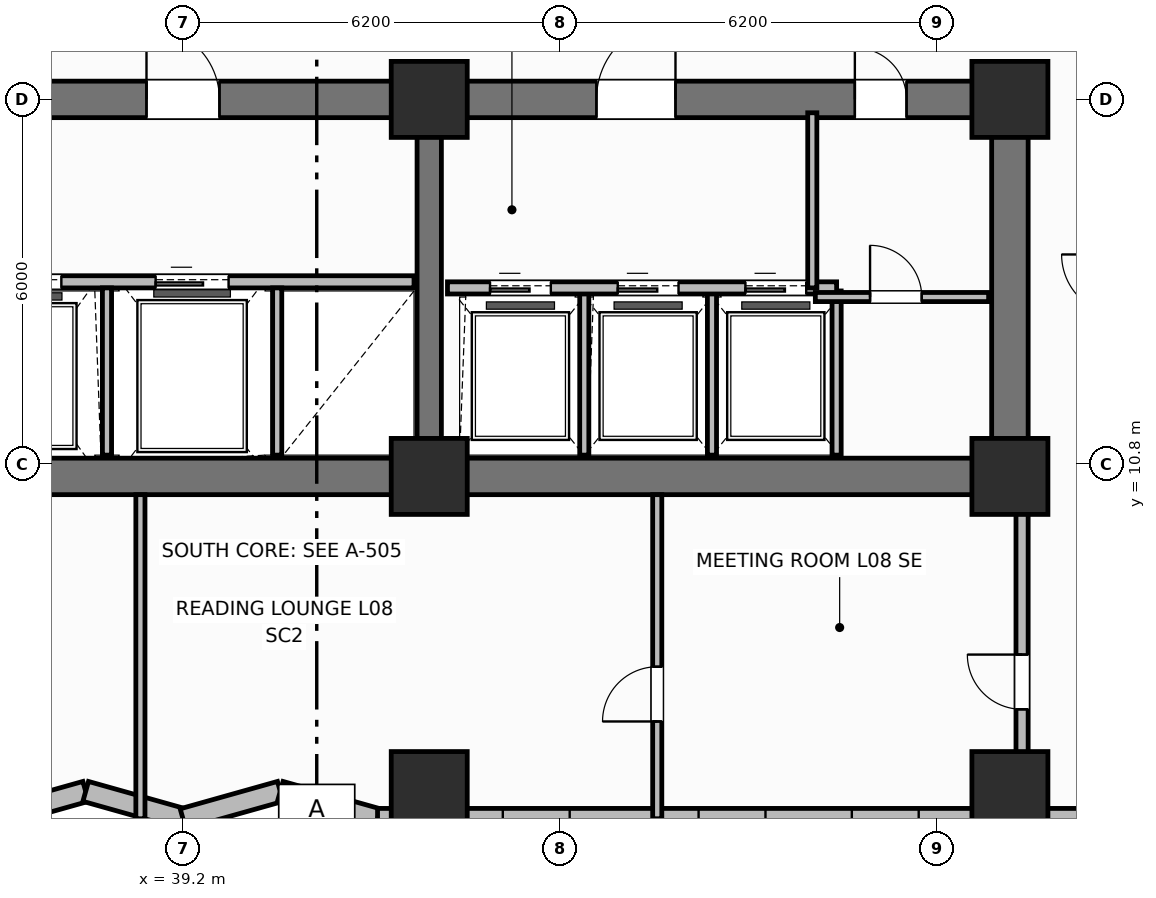
"""IFC4 building model, lengths in metres.
Left out: names, types, materials, properties, quantities, classifications, styles, units other than length and angle.
Written with IfcOpenShell. Run it as: python <this file> out.ifc"""

import sys

from ifc_helpers import new_model, si_unit, direction, frame, frame_2d, origin, origin_2d, place, context, subcontext, project, spatial, rectangle, extrude, element, fill, save


model = new_model("IFC4")
c1 = context("Model", 3, precision=1e-05, world=origin(), true_north=direction((0.0, 1.0)))
c2 = subcontext(c1, "Body", "Model", "MODEL_VIEW")
j1 = project(units=[si_unit("LENGTHUNIT", "METRE"), si_unit("PLANEANGLEUNIT", "RADIAN")], contexts=[c1])
p1 = place(None, origin())
s1 = spatial("IfcSite", under=j1, at=p1, CompositionType="ELEMENT")
p2 = place(p1, origin())
s2 = spatial("IfcBuilding", under=s1, at=p2, CompositionType="ELEMENT")
p3 = place(p2, frame((0.0, 0.0, 36.2)))
s3 = spatial("IfcBuildingStorey", under=s2, at=p3, CompositionType="ELEMENT", Elevation=36.2)
p4 = place(p3, frame((52.8, 10.6, 0.0), z_axis=(0.0, 0.0, 1.0), x_axis=(-1.0, 0.0, 0.0)))
e1 = element("IfcWall", 1, at=p4, inside=s3, PredefinedType="SHEAR", context=c2, shape_type="SweptSolid", body=[
    extrude(rectangle(XDim=27.2, YDim=0.6, at=frame_2d((13.6, 0.0))), origin(), (0.0, 0.0, 1.0), 3.7),
])
p5 = place(p3, frame((52.8, 10.9, 0.0), z_axis=(0.0, 0.0, 1.0), x_axis=(0.0, 1.0, 0.0)))
e2 = element("IfcWall", 2, at=p5, inside=s3, PredefinedType="SHEAR", context=c2, shape_type="SweptSolid", body=[
    extrude(rectangle(XDim=5.6, YDim=0.6, at=frame_2d((2.8, 0.0))), origin(), (0.0, 0.0, 1.0), 3.7),
])
p6 = place(p3, frame((25.6, 16.8, 0.0), z_axis=(0.0, 0.0, 1.0), x_axis=(1.0, 0.0, 0.0)))
e3 = element("IfcWall", 3, at=p6, inside=s3, PredefinedType="SHEAR", context=c2, shape_type="SweptSolid", body=[
    extrude(rectangle(XDim=27.2, YDim=0.6, at=frame_2d((13.6, 0.0))), origin(), (0.0, 0.0, 1.0), 3.7),
])
p7 = place(p6, frame((1.7, 0.0, 0.0)))
e4 = element("IfcOpeningElement", 4, at=p7, cuts=e3, PredefinedType="OPENING", context=c2, shape_type="SweptSolid", body=[
    extrude(rectangle(XDim=1.1, YDim=2.15, at=frame_2d((0.55, 1.075))), frame((0.0, 0.31, 0.0), z_axis=(0.0, -1.0, 0.0), x_axis=(1.0, 0.0, 0.0)), (0.0, 0.0, 1.0), 0.62),
])
p8 = place(p6, frame((4.45, 0.0, 0.0)))
e5 = element("IfcOpeningElement", 5, at=p8, cuts=e3, PredefinedType="OPENING", context=c2, shape_type="SweptSolid", body=[
    extrude(rectangle(XDim=0.85, YDim=2.1, at=frame_2d((0.425, 1.05))), frame((0.0, 0.31, 0.0), z_axis=(0.0, -1.0, 0.0), x_axis=(1.0, 0.0, 0.0)), (0.0, 0.0, 1.0), 0.62),
])
p9 = place(p6, frame((6.5, 0.0, 0.0)))
e6 = element("IfcOpeningElement", 6, at=p9, cuts=e3, PredefinedType="OPENING", context=c2, shape_type="SweptSolid", body=[
    extrude(rectangle(XDim=0.85, YDim=2.1, at=frame_2d((0.425, 1.05))), frame((0.0, 0.31, 0.0), z_axis=(0.0, -1.0, 0.0), x_axis=(1.0, 0.0, 0.0)), (0.0, 0.0, 1.0), 0.62),
])
p10 = place(p6, frame((13.0, 0.0, 0.0)))
e7 = element("IfcOpeningElement", 7, at=p10, cuts=e3, PredefinedType="OPENING", context=c2, shape_type="SweptSolid", body=[
    extrude(rectangle(XDim=1.2, YDim=2.15, at=frame_2d((0.6, 1.075))), frame((0.0, 0.31, 0.0), z_axis=(0.0, -1.0, 0.0), x_axis=(1.0, 0.0, 0.0)), (0.0, 0.0, 1.0), 0.62),
])
p11 = place(p6, frame((20.4, 0.0, 0.0)))
e8 = element("IfcOpeningElement", 8, at=p11, cuts=e3, PredefinedType="OPENING", context=c2, shape_type="SweptSolid", body=[
    extrude(rectangle(XDim=1.3, YDim=2.2, at=frame_2d((0.65, 1.1))), frame((0.0, 0.31, 0.0), z_axis=(0.0, -1.0, 0.0), x_axis=(1.0, 0.0, 0.0)), (0.0, 0.0, 1.0), 0.62),
])
p12 = place(p6, frame((24.65, 0.0, 0.0)))
e9 = element("IfcOpeningElement", 9, at=p12, cuts=e3, PredefinedType="OPENING", context=c2, shape_type="SweptSolid", body=[
    extrude(rectangle(XDim=0.85, YDim=2.1, at=frame_2d((0.425, 1.05))), frame((0.0, 0.31, 0.0), z_axis=(0.0, -1.0, 0.0), x_axis=(1.0, 0.0, 0.0)), (0.0, 0.0, 1.0), 0.62),
])
p13 = place(p3, frame((43.25, 10.9, 0.0), z_axis=(0.0, 0.0, 1.0), x_axis=(0.0, 1.0, 0.0)))
e10 = element("IfcWall", 10, at=p13, inside=s3, PredefinedType="SHEAR", context=c2, shape_type="SweptSolid", body=[
    extrude(rectangle(XDim=5.6, YDim=0.4, at=frame_2d((2.8, 0.0))), origin(), (0.0, 0.0, 1.0), 3.7),
])
for number, where, z_axis, x_axis in (
    (11, (43.25, 10.6, 0.0), (0.0, 0.0, 1.0), (1.0, 0.0, 0.0)),
    (12, (43.25, 16.8, 0.0), (0.0, 0.0, 1.0), (1.0, 0.0, 0.0)),
    (13, (52.8, 10.6, 0.0), (0.0, 0.0, 1.0), (1.0, 0.0, 0.0)),
    (14, (52.8, 16.8, 0.0), (0.0, 0.0, 1.0), (1.0, 0.0, 0.0)),
    (15, (43.25, 5.45, 0.0), (0.0, 0.0, 1.0), (1.0, 0.0, 0.0)),
    (16, (52.8, 5.45, 0.0), (0.0, 0.0, 1.0), (1.0, 0.0, 0.0)),
):
    element("IfcColumn", number, at=place(p3, frame(where, z_axis=z_axis, x_axis=x_axis)), inside=s3, PredefinedType="COLUMN", context=c2, shape_type="SweptSolid", body=[
        extrude(rectangle(XDim=1.25, YDim=1.25, at=origin_2d()), origin(), (0.0, 0.0, 1.0), 3.7),
    ])
p14 = place(p3, frame((36.0, 4.97, 0.0), z_axis=(0.0, 0.0, 1.0), x_axis=(0.962662902433, 0.270703040766, 0.0)))
e17 = element("IfcWall", 17, at=p14, inside=s3, PredefinedType="SOLIDWALL", context=c2, shape_type="SweptSolid", body=[
    extrude(rectangle(XDim=1.662, YDim=0.34, at=frame_2d((0.831, 0.0))), origin(), (0.0, 0.0, 1.0), 2.7),
])
p15 = place(p3, frame((37.6, 5.42, 0.0), z_axis=(0.0, 0.0, 1.0), x_axis=(0.962652136636, -0.270741322725, 0.0)))
e18 = element("IfcWall", 18, at=p15, inside=s3, PredefinedType="SOLIDWALL", context=c2, shape_type="SweptSolid", body=[
    extrude(rectangle(XDim=1.662, YDim=0.34, at=frame_2d((0.831, 0.0))), origin(), (0.0, 0.0, 1.0), 2.7),
])
p16 = place(p3, frame((39.2, 4.97, 0.0), z_axis=(0.0, 0.0, 1.0), x_axis=(0.962662902433, 0.270703040766, 0.0)))
e19 = element("IfcWall", 19, at=p16, inside=s3, PredefinedType="SOLIDWALL", context=c2, shape_type="SweptSolid", body=[
    extrude(rectangle(XDim=1.662, YDim=0.34, at=frame_2d((0.831, 0.0))), origin(), (0.0, 0.0, 1.0), 2.7),
])
p17 = place(p3, frame((40.8, 5.42, 0.0), z_axis=(0.0, 0.0, 1.0), x_axis=(0.962652136636, -0.270741322725, 0.0)))
e20 = element("IfcWall", 20, at=p17, inside=s3, PredefinedType="SOLIDWALL", context=c2, shape_type="SweptSolid", body=[
    extrude(rectangle(XDim=1.662, YDim=0.34, at=frame_2d((0.831, 0.0))), origin(), (0.0, 0.0, 1.0), 2.7),
])
p18 = place(p3, frame((42.4, 4.97, 0.0), z_axis=(0.0, 0.0, 1.0), x_axis=(1.0, 0.0, 0.0)))
e21 = element("IfcWall", 21, at=p18, inside=s3, PredefinedType="SOLIDWALL", context=c2, shape_type="SweptSolid", body=[
    extrude(rectangle(XDim=17.4, YDim=0.34, at=frame_2d((8.7, 0.0))), origin(), (0.0, 0.0, 1.0), 2.7),
])
p19 = place(p18, frame((2.06, 0.0, 0.93)))
e22 = element("IfcOpeningElement", 22, at=p19, cuts=e21, PredefinedType="OPENING", context=c2, shape_type="SweptSolid", body=[
    extrude(rectangle(XDim=1.1, YDim=1.65, at=frame_2d((0.55, 0.825))), frame((0.0, 0.18, 0.0), z_axis=(0.0, -1.0, 0.0), x_axis=(1.0, 0.0, 0.0)), (0.0, 0.0, 1.0), 0.36),
])
p20 = place(p18, frame((5.28, 0.0, 0.93)))
e23 = element("IfcOpeningElement", 23, at=p20, cuts=e21, PredefinedType="OPENING", context=c2, shape_type="SweptSolid", body=[
    extrude(rectangle(XDim=1.1, YDim=1.65, at=frame_2d((0.55, 0.825))), frame((0.0, 0.18, 0.0), z_axis=(0.0, -1.0, 0.0), x_axis=(1.0, 0.0, 0.0)), (0.0, 0.0, 1.0), 0.36),
])
p21 = place(p18, frame((7.8, 0.0, 0.93)))
e24 = element("IfcOpeningElement", 24, at=p21, cuts=e21, PredefinedType="OPENING", context=c2, shape_type="SweptSolid", body=[
    extrude(rectangle(XDim=1.1, YDim=1.65, at=frame_2d((0.55, 0.825))), frame((0.0, 0.18, 0.0), z_axis=(0.0, -1.0, 0.0), x_axis=(1.0, 0.0, 0.0)), (0.0, 0.0, 1.0), 0.36),
])
p22 = place(p18, frame((14.59, 0.0, 0.93)))
e25 = element("IfcOpeningElement", 25, at=p22, cuts=e21, PredefinedType="OPENING", context=c2, shape_type="SweptSolid", body=[
    extrude(rectangle(XDim=1.1, YDim=1.65, at=frame_2d((0.55, 0.825))), frame((0.0, 0.18, 0.0), z_axis=(0.0, -1.0, 0.0), x_axis=(1.0, 0.0, 0.0)), (0.0, 0.0, 1.0), 0.36),
])
p23 = place(p3, frame((35.4, 13.8, 0.0), z_axis=(0.0, 0.0, 1.0), x_axis=(1.0, 0.0, 0.0)))
e26 = element("IfcWall", 26, at=p23, inside=s3, PredefinedType="PARTITIONING", context=c2, shape_type="SweptSolid", body=[
    extrude(rectangle(XDim=7.6, YDim=0.2, at=frame_2d((3.8, 0.0))), origin(), (0.0, 0.0, 1.0), 2.3),
])
p24 = place(p23, frame((0.7, 0.0, 0.0)))
e27 = element("IfcOpeningElement", 27, at=p24, cuts=e26, PredefinedType="OPENING", context=c2, shape_type="SweptSolid", body=[
    extrude(rectangle(XDim=1.1, YDim=2.15, at=frame_2d((0.55, 1.075))), frame((0.0, 0.11, 0.0), z_axis=(0.0, -1.0, 0.0), x_axis=(1.0, 0.0, 0.0)), (0.0, 0.0, 1.0), 0.22),
])
p25 = place(p23, frame((3.35, 0.0, 0.0)))
e28 = element("IfcOpeningElement", 28, at=p25, cuts=e26, PredefinedType="OPENING", context=c2, shape_type="SweptSolid", body=[
    extrude(rectangle(XDim=1.2, YDim=2.15, at=frame_2d((0.6, 1.075))), frame((0.0, 0.11, 0.0), z_axis=(0.0, -1.0, 0.0), x_axis=(1.0, 0.0, 0.0)), (0.0, 0.0, 1.0), 0.22),
])
for number, where, z_axis, x_axis in (
    (29, (37.95, 10.95, 0.0), (0.0, 0.0, 1.0), (0.0, 1.0, 0.0)),
    (30, (40.75, 10.95, 0.0), (0.0, 0.0, 1.0), (0.0, 1.0, 0.0)),
):
    element("IfcWall", number, at=place(p3, frame(where, z_axis=z_axis, x_axis=x_axis)), inside=s3, PredefinedType="PARTITIONING", context=c2, shape_type="SweptSolid", body=[
        extrude(rectangle(XDim=2.75, YDim=0.15, at=frame_2d((1.375, 0.0))), origin(), (0.0, 0.0, 1.0), 2.53),
    ])
for number, where, z_axis, x_axis in (
    (31, (45.8, 10.95, 0.0), (0.0, 0.0, 1.0), (0.0, 1.0, 0.0)),
    (32, (47.9, 10.95, 0.0), (0.0, 0.0, 1.0), (0.0, 1.0, 0.0)),
    (33, (49.95, 10.95, 0.0), (0.0, 0.0, 1.0), (0.0, 1.0, 0.0)),
):
    element("IfcWall", number, at=place(p3, frame(where, z_axis=z_axis, x_axis=x_axis)), inside=s3, PredefinedType="PARTITIONING", context=c2, shape_type="SweptSolid", body=[
        extrude(rectangle(XDim=2.7, YDim=0.15, at=frame_2d((1.35, 0.0))), origin(), (0.0, 0.0, 1.0), 2.53),
    ])
p26 = place(p3, frame((43.55, 13.7, 0.0), z_axis=(0.0, 0.0, 1.0), x_axis=(1.0, 0.0, 0.0)))
e34 = element("IfcWall", 34, at=p26, inside=s3, PredefinedType="PARTITIONING", context=c2, shape_type="SweptSolid", body=[
    extrude(rectangle(XDim=6.4, YDim=0.2, at=frame_2d((3.2, 0.0))), origin(), (0.0, 0.0, 1.0), 2.53),
])
p27 = place(p26, frame((0.7, 0.0, 0.0)))
e35 = element("IfcOpeningElement", 35, at=p27, cuts=e34, PredefinedType="OPENING", context=c2, shape_type="SweptSolid", body=[
    extrude(rectangle(XDim=1.0, YDim=2.15, at=frame_2d((0.5, 1.075))), frame((0.0, 0.11, 0.0), z_axis=(0.0, -1.0, 0.0), x_axis=(1.0, 0.0, 0.0)), (0.0, 0.0, 1.0), 0.22),
])
p28 = place(p26, frame((2.8, 0.0, 0.0)))
e36 = element("IfcOpeningElement", 36, at=p28, cuts=e34, PredefinedType="OPENING", context=c2, shape_type="SweptSolid", body=[
    extrude(rectangle(XDim=1.0, YDim=2.15, at=frame_2d((0.5, 1.075))), frame((0.0, 0.11, 0.0), z_axis=(0.0, -1.0, 0.0), x_axis=(1.0, 0.0, 0.0)), (0.0, 0.0, 1.0), 0.22),
])
p29 = place(p26, frame((4.9, 0.0, 0.0)))
e37 = element("IfcOpeningElement", 37, at=p29, cuts=e34, PredefinedType="OPENING", context=c2, shape_type="SweptSolid", body=[
    extrude(rectangle(XDim=1.0, YDim=2.15, at=frame_2d((0.5, 1.075))), frame((0.0, 0.11, 0.0), z_axis=(0.0, -1.0, 0.0), x_axis=(1.0, 0.0, 0.0)), (0.0, 0.0, 1.0), 0.22),
])
p30 = place(p3, frame((49.55, 13.7, 0.0), z_axis=(0.0, 0.0, 1.0), x_axis=(0.0, 1.0, 0.0)))
e38 = element("IfcWall", 38, at=p30, inside=s3, PredefinedType="PARTITIONING", context=c2, shape_type="SweptSolid", body=[
    extrude(rectangle(XDim=2.88, YDim=0.15, at=frame_2d((1.44, 0.0))), origin(), (0.0, 0.0, 1.0), 2.53),
])
p31 = place(p3, frame((49.6, 13.55, 0.0), z_axis=(0.0, 0.0, 1.0), x_axis=(1.0, 0.0, 0.0)))
e39 = element("IfcWall", 39, at=p31, inside=s3, PredefinedType="PARTITIONING", context=c2, shape_type="SweptSolid", body=[
    extrude(rectangle(XDim=2.85, YDim=0.15, at=frame_2d((1.425, 0.0))), origin(), (0.0, 0.0, 1.0), 2.53),
])
p32 = place(p31, frame((0.9, 0.0, 0.0)))
e40 = element("IfcOpeningElement", 40, at=p32, cuts=e39, PredefinedType="OPENING", context=c2, shape_type="SweptSolid", body=[
    extrude(rectangle(XDim=0.85, YDim=2.1, at=frame_2d((0.425, 1.05))), frame((0.0, 0.085, 0.0), z_axis=(0.0, -1.0, 0.0), x_axis=(1.0, 0.0, 0.0)), (0.0, 0.0, 1.0), 0.17),
])
p33 = place(p3, frame((38.5, 4.97, 0.0), z_axis=(0.0, 0.0, 1.0), x_axis=(0.0, 1.0, 0.0)))
e41 = element("IfcWall", 41, at=p33, inside=s3, PredefinedType="PARTITIONING", context=c2, shape_type="SweptSolid", body=[
    extrude(rectangle(XDim=5.33, YDim=0.15, at=frame_2d((2.665, 0.0))), origin(), (0.0, 0.0, 1.0), 2.53),
])
p34 = place(p3, frame((47.0, 4.97, 0.0), z_axis=(0.0, 0.0, 1.0), x_axis=(0.0, 1.0, 0.0)))
e42 = element("IfcWall", 42, at=p34, inside=s3, PredefinedType="PARTITIONING", context=c2, shape_type="SweptSolid", body=[
    extrude(rectangle(XDim=5.33, YDim=0.15, at=frame_2d((2.665, 0.0))), origin(), (0.0, 0.0, 1.0), 2.53),
])
p35 = place(p34, frame((1.6, 0.0, 0.0)))
e43 = element("IfcOpeningElement", 43, at=p35, cuts=e42, PredefinedType="OPENING", context=c2, shape_type="SweptSolid", body=[
    extrude(rectangle(XDim=0.9, YDim=2.1, at=frame_2d((0.45, 1.05))), frame((0.0, 0.085, 0.0), z_axis=(0.0, -1.0, 0.0), x_axis=(1.0, 0.0, 0.0)), (0.0, 0.0, 1.0), 0.17),
])
p36 = place(p3, frame((53.0, 5.92, 0.0), z_axis=(0.0, 0.0, 1.0), x_axis=(0.0, 1.0, 0.0)))
e44 = element("IfcWall", 44, at=p36, inside=s3, PredefinedType="PARTITIONING", context=c2, shape_type="SweptSolid", body=[
    extrude(rectangle(XDim=4.38, YDim=0.2, at=frame_2d((2.19, 0.0))), origin(), (0.0, 0.0, 1.0), 2.53),
])
p37 = place(p36, frame((0.85, 0.0, 0.0)))
e45 = element("IfcOpeningElement", 45, at=p37, cuts=e44, PredefinedType="OPENING", context=c2, shape_type="SweptSolid", body=[
    extrude(rectangle(XDim=0.9, YDim=2.1, at=frame_2d((0.45, 1.05))), frame((0.0, 0.11, 0.0), z_axis=(0.0, -1.0, 0.0), x_axis=(1.0, 0.0, 0.0)), (0.0, 0.0, 1.0), 0.22),
])
p38 = place(p19, origin())
e46 = element("IfcWindow", 46, at=p38, inside=s3, PartitioningType="SINGLE_PANEL", PredefinedType="WINDOW", context=c2, shape_type="SweptSolid", body=[
    extrude(rectangle(XDim=1.1, YDim=1.65, at=frame_2d((0.55, 0.825))), frame((0.0, 0.03, 0.0), z_axis=(0.0, -1.0, 0.0), x_axis=(1.0, 0.0, 0.0)), (0.0, 0.0, 1.0), 0.06),
])
fill(e22, e46)
p39 = place(p20, origin())
e47 = element("IfcWindow", 47, at=p39, inside=s3, PartitioningType="SINGLE_PANEL", PredefinedType="WINDOW", context=c2, shape_type="SweptSolid", body=[
    extrude(rectangle(XDim=1.1, YDim=1.65, at=frame_2d((0.55, 0.825))), frame((0.0, 0.03, 0.0), z_axis=(0.0, -1.0, 0.0), x_axis=(1.0, 0.0, 0.0)), (0.0, 0.0, 1.0), 0.06),
])
fill(e23, e47)
p40 = place(p21, origin())
e48 = element("IfcWindow", 48, at=p40, inside=s3, PartitioningType="SINGLE_PANEL", PredefinedType="WINDOW", context=c2, shape_type="SweptSolid", body=[
    extrude(rectangle(XDim=1.1, YDim=1.65, at=frame_2d((0.55, 0.825))), frame((0.0, 0.03, 0.0), z_axis=(0.0, -1.0, 0.0), x_axis=(1.0, 0.0, 0.0)), (0.0, 0.0, 1.0), 0.06),
])
fill(e24, e48)
p41 = place(p24, origin())
e49 = element("IfcDoor", 49, at=p41, inside=s3, OperationType="SLIDING_TO_LEFT", PredefinedType="DOOR", context=c2, shape_type="SweptSolid", body=[
    extrude(rectangle(XDim=1.1, YDim=2.15, at=frame_2d((0.55, 1.075))), frame((0.0, 0.025, 0.0), z_axis=(0.0, -1.0, 0.0), x_axis=(1.0, 0.0, 0.0)), (0.0, 0.0, 1.0), 0.05),
])
fill(e27, e49)
p42 = place(p25, origin())
e50 = element("IfcDoor", 50, at=p42, inside=s3, OperationType="SLIDING_TO_LEFT", PredefinedType="DOOR", context=c2, shape_type="SweptSolid", body=[
    extrude(rectangle(XDim=1.2, YDim=2.15, at=frame_2d((0.6, 1.075))), frame((0.0, 0.025, 0.0), z_axis=(0.0, -1.0, 0.0), x_axis=(1.0, 0.0, 0.0)), (0.0, 0.0, 1.0), 0.05),
])
fill(e28, e50)
p43 = place(p27, origin())
e51 = element("IfcDoor", 51, at=p43, inside=s3, OperationType="SLIDING_TO_LEFT", PredefinedType="DOOR", context=c2, shape_type="SweptSolid", body=[
    extrude(rectangle(XDim=1.0, YDim=2.15, at=frame_2d((0.5, 1.075))), frame((0.0, 0.025, 0.0), z_axis=(0.0, -1.0, 0.0), x_axis=(1.0, 0.0, 0.0)), (0.0, 0.0, 1.0), 0.05),
])
fill(e35, e51)
p44 = place(p28, origin())
e52 = element("IfcDoor", 52, at=p44, inside=s3, OperationType="SLIDING_TO_LEFT", PredefinedType="DOOR", context=c2, shape_type="SweptSolid", body=[
    extrude(rectangle(XDim=1.0, YDim=2.15, at=frame_2d((0.5, 1.075))), frame((0.0, 0.025, 0.0), z_axis=(0.0, -1.0, 0.0), x_axis=(1.0, 0.0, 0.0)), (0.0, 0.0, 1.0), 0.05),
])
fill(e36, e52)
p45 = place(p29, origin())
e53 = element("IfcDoor", 53, at=p45, inside=s3, OperationType="SLIDING_TO_LEFT", PredefinedType="DOOR", context=c2, shape_type="SweptSolid", body=[
    extrude(rectangle(XDim=1.0, YDim=2.15, at=frame_2d((0.5, 1.075))), frame((0.0, 0.025, 0.0), z_axis=(0.0, -1.0, 0.0), x_axis=(1.0, 0.0, 0.0)), (0.0, 0.0, 1.0), 0.05),
])
fill(e37, e53)
p46 = place(p32, origin())
e54 = element("IfcDoor", 54, at=p46, inside=s3, OperationType="SINGLE_SWING_LEFT", PredefinedType="DOOR", context=c2, shape_type="SweptSolid", body=[
    extrude(rectangle(XDim=0.85, YDim=2.1, at=frame_2d((0.425, 1.05))), frame((0.0, 0.025, 0.0), z_axis=(0.0, -1.0, 0.0), x_axis=(1.0, 0.0, 0.0)), (0.0, 0.0, 1.0), 0.05),
])
fill(e40, e54)
p47 = place(p35, origin())
e55 = element("IfcDoor", 55, at=p47, inside=s3, OperationType="SINGLE_SWING_LEFT", PredefinedType="DOOR", context=c2, shape_type="SweptSolid", body=[
    extrude(rectangle(XDim=0.9, YDim=2.1, at=frame_2d((0.45, 1.05))), frame((0.0, 0.025, 0.0), z_axis=(0.0, -1.0, 0.0), x_axis=(1.0, 0.0, 0.0)), (0.0, 0.0, 1.0), 0.05),
])
fill(e43, e55)
p48 = place(p37, origin())
e56 = element("IfcDoor", 56, at=p48, inside=s3, OperationType="SINGLE_SWING_RIGHT", PredefinedType="DOOR", context=c2, shape_type="SweptSolid", body=[
    extrude(rectangle(XDim=0.9, YDim=2.1, at=frame_2d((0.45, 1.05))), frame((0.0, 0.025, 0.0), z_axis=(0.0, -1.0, 0.0), x_axis=(1.0, 0.0, 0.0)), (0.0, 0.0, 1.0), 0.05),
])
fill(e45, e56)
p49 = place(p10, origin())
e57 = element("IfcDoor", 57, at=p49, inside=s3, OperationType="SINGLE_SWING_LEFT", PredefinedType="DOOR", context=c2, shape_type="SweptSolid", body=[
    extrude(rectangle(XDim=1.2, YDim=2.15, at=frame_2d((0.6, 1.075))), frame((0.0, 0.025, 0.0), z_axis=(0.0, -1.0, 0.0), x_axis=(1.0, 0.0, 0.0)), (0.0, 0.0, 1.0), 0.05),
])
fill(e7, e57)
p50 = place(p11, origin())
e58 = element("IfcDoor", 58, at=p50, inside=s3, OperationType="SINGLE_SWING_RIGHT", PredefinedType="DOOR", context=c2, shape_type="SweptSolid", body=[
    extrude(rectangle(XDim=1.3, YDim=2.2, at=frame_2d((0.65, 1.1))), frame((0.0, 0.025, 0.0), z_axis=(0.0, -1.0, 0.0), x_axis=(1.0, 0.0, 0.0)), (0.0, 0.0, 1.0), 0.05),
])
fill(e8, e58)
p51 = place(p12, origin())
e59 = element("IfcDoor", 59, at=p51, inside=s3, OperationType="SINGLE_SWING_LEFT", PredefinedType="DOOR", context=c2, shape_type="SweptSolid", body=[
    extrude(rectangle(XDim=0.85, YDim=2.1, at=frame_2d((0.425, 1.05))), frame((0.0, 0.025, 0.0), z_axis=(0.0, -1.0, 0.0), x_axis=(1.0, 0.0, 0.0)), (0.0, 0.0, 1.0), 0.05),
])
fill(e9, e59)
save(model, sys.argv[1])
